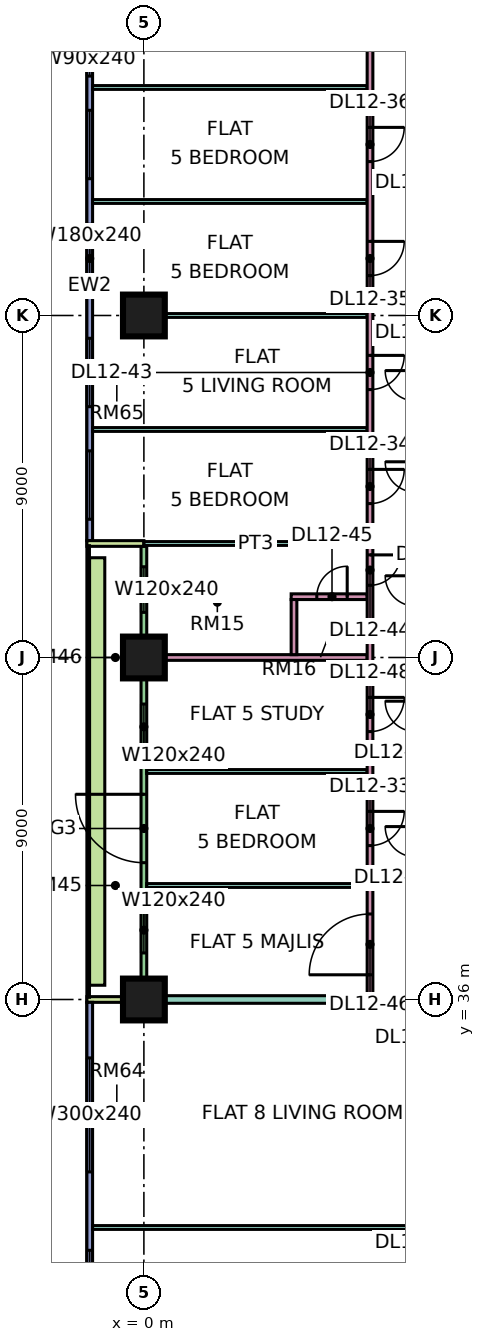
"""IFC4 building model, lengths in metres.
Left out: names, types, materials, properties, quantities, classifications, styles, units other than length and angle.
Written with IfcOpenShell. Run it as: python <this file> out.ifc"""

import sys

from ifc_helpers import new_model, si_unit, direction, frame, frame_2d, origin, origin_2d, place, context, subcontext, project, spatial, rectangle, extrude, element, fill, save


model = new_model("IFC4")
c1 = context("Model", 3, precision=1e-05, world=origin(), true_north=direction((0.0, 1.0)))
c2 = subcontext(c1, "Body", "Model", "MODEL_VIEW")
j1 = project(units=[si_unit("LENGTHUNIT", "METRE"), si_unit("PLANEANGLEUNIT", "RADIAN")], contexts=[c1])
p1 = place(None, origin())
s1 = spatial("IfcSite", under=j1, at=p1, CompositionType="ELEMENT")
p2 = place(p1, origin())
s2 = spatial("IfcBuilding", under=s1, at=p2, CompositionType="ELEMENT")
p3 = place(p2, frame((0.0, 0.0, 60.15)))
s3 = spatial("IfcBuildingStorey", under=s2, at=p3, CompositionType="ELEMENT", Elevation=60.15)
p4 = place(p3, frame((0.0, 36.0, 0.0), z_axis=(0.0, 0.0, 1.0), x_axis=(1.0, 0.0, 0.0)))
e1 = element("IfcColumn", 1, at=p4, inside=s3, PredefinedType="COLUMN", context=c2, shape_type="SweptSolid", body=[
    extrude(rectangle(XDim=1.1, YDim=1.1, at=origin_2d()), origin(), (0.0, 0.0, 1.0), 3.75),
])
p5 = place(p3, frame((0.0, 45.0, 0.0), z_axis=(0.0, 0.0, 1.0), x_axis=(1.0, 0.0, 0.0)))
e2 = element("IfcColumn", 2, at=p5, inside=s3, PredefinedType="COLUMN", context=c2, shape_type="SweptSolid", body=[
    extrude(rectangle(XDim=1.1, YDim=1.1, at=origin_2d()), origin(), (0.0, 0.0, 1.0), 3.75),
])
p6 = place(p3, frame((0.0, 54.0, 0.0), z_axis=(0.0, 0.0, 1.0), x_axis=(1.0, 0.0, 0.0)))
e3 = element("IfcColumn", 3, at=p6, inside=s3, PredefinedType="COLUMN", context=c2, shape_type="SweptSolid", body=[
    extrude(rectangle(XDim=1.1, YDim=1.1, at=origin_2d()), origin(), (0.0, 0.0, 1.0), 3.75),
])
p7 = place(p3, frame((-1.425, 61.5, 0.0), z_axis=(0.0, 0.0, 1.0), x_axis=(0.0, -1.0, 0.0)))
e4 = element("IfcWall", 4, at=p7, inside=s3, PredefinedType="SOLIDWALL", context=c2, shape_type="SweptSolid", body=[
    extrude(rectangle(XDim=13.425, YDim=0.15, at=frame_2d((6.712, 0.0))), origin(), (0.0, 0.0, 1.0), 3.35),
])
p8 = place(p7, frame((0.3, 0.0, 0.45)))
e5 = element("IfcOpeningElement", 5, at=p8, cuts=e4, PredefinedType="OPENING", context=c2, shape_type="SweptSolid", body=[
    extrude(rectangle(XDim=0.9, YDim=2.4, at=frame_2d((0.45, 1.2))), frame((0.0, 0.085, 0.0), z_axis=(0.0, -1.0, 0.0), x_axis=(1.0, 0.0, 0.0)), (0.0, 0.0, 1.0), 0.17),
])
p9 = place(p7, frame((2.1, 0.0, 0.45)))
e6 = element("IfcOpeningElement", 6, at=p9, cuts=e4, PredefinedType="OPENING", context=c2, shape_type="SweptSolid", body=[
    extrude(rectangle(XDim=1.8, YDim=2.4, at=frame_2d((0.9, 1.2))), frame((0.0, 0.085, 0.0), z_axis=(0.0, -1.0, 0.0), x_axis=(1.0, 0.0, 0.0)), (0.0, 0.0, 1.0), 0.17),
])
p10 = place(p7, frame((5.1, 0.0, 0.45)))
e7 = element("IfcOpeningElement", 7, at=p10, cuts=e4, PredefinedType="OPENING", context=c2, shape_type="SweptSolid", body=[
    extrude(rectangle(XDim=1.8, YDim=2.4, at=frame_2d((0.9, 1.2))), frame((0.0, 0.085, 0.0), z_axis=(0.0, -1.0, 0.0), x_axis=(1.0, 0.0, 0.0)), (0.0, 0.0, 1.0), 0.17),
])
p11 = place(p7, frame((8.1, 0.0, 0.45)))
e8 = element("IfcOpeningElement", 8, at=p11, cuts=e4, PredefinedType="OPENING", context=c2, shape_type="SweptSolid", body=[
    extrude(rectangle(XDim=1.8, YDim=2.4, at=frame_2d((0.9, 1.2))), frame((0.0, 0.085, 0.0), z_axis=(0.0, -1.0, 0.0), x_axis=(1.0, 0.0, 0.0)), (0.0, 0.0, 1.0), 0.17),
])
p12 = place(p7, frame((11.062, 0.0, 0.45)))
e9 = element("IfcOpeningElement", 9, at=p12, cuts=e4, PredefinedType="OPENING", context=c2, shape_type="SweptSolid", body=[
    extrude(rectangle(XDim=1.8, YDim=2.4, at=frame_2d((0.9, 1.2))), frame((0.0, 0.085, 0.0), z_axis=(0.0, -1.0, 0.0), x_axis=(1.0, 0.0, 0.0)), (0.0, 0.0, 1.0), 0.17),
])
p13 = place(p3, frame((0.0, 47.925, 0.0), z_axis=(0.0, 0.0, 1.0), x_axis=(0.0, -1.0, 0.0)))
e10 = element("IfcWall", 10, at=p13, inside=s3, PredefinedType="SOLIDWALL", context=c2, shape_type="SweptSolid", body=[
    extrude(rectangle(XDim=11.85, YDim=0.15, at=frame_2d((5.925, 0.0))), origin(), (0.0, 0.0, 1.0), 3.35),
])
p14 = place(p13, frame((0.538, 0.0, 0.45)))
e11 = element("IfcOpeningElement", 11, at=p14, cuts=e10, PredefinedType="OPENING", context=c2, shape_type="SweptSolid", body=[
    extrude(rectangle(XDim=1.2, YDim=2.4, at=frame_2d((0.6, 1.2))), frame((0.0, 0.085, 0.0), z_axis=(0.0, -1.0, 0.0), x_axis=(1.0, 0.0, 0.0)), (0.0, 0.0, 1.0), 0.17),
])
p15 = place(p13, frame((4.15, 0.0, 0.45)))
e12 = element("IfcOpeningElement", 12, at=p15, cuts=e10, PredefinedType="OPENING", context=c2, shape_type="SweptSolid", body=[
    extrude(rectangle(XDim=1.2, YDim=2.4, at=frame_2d((0.6, 1.2))), frame((0.0, 0.085, 0.0), z_axis=(0.0, -1.0, 0.0), x_axis=(1.0, 0.0, 0.0)), (0.0, 0.0, 1.0), 0.17),
])
p16 = place(p13, frame((6.525, 0.0, 0.0)))
e13 = element("IfcOpeningElement", 13, at=p16, cuts=e10, PredefinedType="OPENING", context=c2, shape_type="SweptSolid", body=[
    extrude(rectangle(XDim=1.8, YDim=2.4, at=frame_2d((0.9, 1.2))), frame((0.0, 0.085, 0.0), z_axis=(0.0, -1.0, 0.0), x_axis=(1.0, 0.0, 0.0)), (0.0, 0.0, 1.0), 0.17),
])
p17 = place(p13, frame((9.5, 0.0, 0.45)))
e14 = element("IfcOpeningElement", 14, at=p17, cuts=e10, PredefinedType="OPENING", context=c2, shape_type="SweptSolid", body=[
    extrude(rectangle(XDim=1.2, YDim=2.4, at=frame_2d((0.6, 1.2))), frame((0.0, 0.085, 0.0), z_axis=(0.0, -1.0, 0.0), x_axis=(1.0, 0.0, 0.0)), (0.0, 0.0, 1.0), 0.17),
])
for number, where, z_axis, x_axis in (
    (15, (-1.5, 48.0, 0.0), (0.0, 0.0, 1.0), (1.0, 0.0, 0.0)),
    (16, (-1.5, 36.0, 0.0), (0.0, 0.0, 1.0), (1.0, 0.0, 0.0)),
):
    element("IfcWall", number, at=place(p3, frame(where, z_axis=z_axis, x_axis=x_axis)), inside=s3, PredefinedType="SOLIDWALL", context=c2, shape_type="SweptSolid", body=[
        extrude(rectangle(XDim=1.5, YDim=0.15, at=frame_2d((0.75, 0.0))), origin(), (0.0, 0.0, 1.0), 3.35),
    ])
p18 = place(p3, frame((-1.425, 35.925, 0.0), z_axis=(0.0, 0.0, 1.0), x_axis=(0.0, -1.0, 0.0)))
e17 = element("IfcWall", 17, at=p18, inside=s3, PredefinedType="SOLIDWALL", context=c2, shape_type="SweptSolid", body=[
    extrude(rectangle(XDim=11.85, YDim=0.15, at=frame_2d((5.925, 0.0))), origin(), (0.0, 0.0, 1.0), 3.35),
])
p19 = place(p18, frame((1.462, 0.0, 0.45)))
e18 = element("IfcOpeningElement", 18, at=p19, cuts=e17, PredefinedType="OPENING", context=c2, shape_type="SweptSolid", body=[
    extrude(rectangle(XDim=3.0, YDim=2.4, at=frame_2d((1.5, 1.2))), frame((0.0, 0.085, 0.0), z_axis=(0.0, -1.0, 0.0), x_axis=(1.0, 0.0, 0.0)), (0.0, 0.0, 1.0), 0.17),
])
p20 = place(p18, frame((6.525, 0.0, 0.45)))
e19 = element("IfcOpeningElement", 19, at=p20, cuts=e17, PredefinedType="OPENING", context=c2, shape_type="SweptSolid", body=[
    extrude(rectangle(XDim=1.8, YDim=2.4, at=frame_2d((0.9, 1.2))), frame((0.0, 0.085, 0.0), z_axis=(0.0, -1.0, 0.0), x_axis=(1.0, 0.0, 0.0)), (0.0, 0.0, 1.0), 0.17),
])
p21 = place(p18, frame((9.488, 0.0, 0.45)))
e20 = element("IfcOpeningElement", 20, at=p21, cuts=e17, PredefinedType="OPENING", context=c2, shape_type="SweptSolid", body=[
    extrude(rectangle(XDim=1.8, YDim=2.4, at=frame_2d((0.9, 1.2))), frame((0.0, 0.085, 0.0), z_axis=(0.0, -1.0, 0.0), x_axis=(1.0, 0.0, 0.0)), (0.0, 0.0, 1.0), 0.17),
])
p22 = place(p3, frame((-1.229, 47.625, 0.0), z_axis=(0.0, 0.0, 1.0), x_axis=(0.0, -1.0, 0.0)))
e21 = element("IfcWall", 21, at=p22, inside=s3, PredefinedType="SOLIDWALL", context=c2, shape_type="SweptSolid", body=[
    extrude(rectangle(XDim=11.25, YDim=0.4, at=frame_2d((5.625, 0.0))), origin(), (0.0, 0.0, 1.0), 0.7),
])
for number, where, z_axis, x_axis in (
    (22, (-1.351, 57.0, 0.0), (0.0, 0.0, 1.0), (1.0, 0.0, 0.0)),
    (23, (-1.351, 60.0, 0.0), (0.0, 0.0, 1.0), (1.0, 0.0, 0.0)),
):
    element("IfcWall", number, at=place(p3, frame(where, z_axis=z_axis, x_axis=x_axis)), inside=s3, PredefinedType="PARTITIONING", context=c2, shape_type="SweptSolid", body=[
        extrude(rectangle(XDim=7.226, YDim=0.1, at=frame_2d((3.613, 0.0))), origin(), (0.0, 0.0, 1.0), 3.35),
    ])
p23 = place(p3, frame((-1.35, 30.0, 0.0), z_axis=(0.0, 0.0, 1.0), x_axis=(1.0, 0.0, 0.0)))
e24 = element("IfcWall", 24, at=p23, inside=s3, PredefinedType="PARTITIONING", context=c2, shape_type="SweptSolid", body=[
    extrude(rectangle(XDim=8.45, YDim=0.1, at=frame_2d((4.225, 0.0))), origin(), (0.0, 0.0, 1.0), 3.35),
])
e25 = element("IfcWall", 25, at=p4, inside=s3, PredefinedType="PARTITIONING", context=c2, shape_type="SweptSolid", body=[
    extrude(rectangle(XDim=12.45, YDim=0.2, at=frame_2d((6.225, 0.0))), origin(), (0.0, 0.0, 1.0), 3.35),
])
p24 = place(p3, frame((0.0, 48.0, 0.0), z_axis=(0.0, 0.0, 1.0), x_axis=(1.0, 0.0, 0.0)))
e26 = element("IfcWall", 26, at=p24, inside=s3, PredefinedType="PARTITIONING", context=c2, shape_type="SweptSolid", body=[
    extrude(rectangle(XDim=5.875, YDim=0.1, at=frame_2d((2.938, 0.0))), origin(), (0.0, 0.0, 1.0), 3.35),
])
p25 = place(p3, frame((-1.35, 51.0, 0.0), z_axis=(0.0, 0.0, 1.0), x_axis=(1.0, 0.0, 0.0)))
e27 = element("IfcWall", 27, at=p25, inside=s3, PredefinedType="PARTITIONING", context=c2, shape_type="SweptSolid", body=[
    extrude(rectangle(XDim=7.225, YDim=0.1, at=frame_2d((3.613, 0.0))), origin(), (0.0, 0.0, 1.0), 3.35),
])
e28 = element("IfcWall", 28, at=p6, inside=s3, PredefinedType="PARTITIONING", context=c2, shape_type="SweptSolid", body=[
    extrude(rectangle(XDim=5.875, YDim=0.1, at=frame_2d((2.938, 0.0))), origin(), (0.0, 0.0, 1.0), 3.35),
])
for number, where, z_axis, x_axis in (
    (29, (0.074, 39.0, 0.0), (0.0, 0.0, 1.0), (1.0, 0.0, 0.0)),
    (30, (0.074, 42.0, 0.0), (0.0, 0.0, 1.0), (1.0, 0.0, 0.0)),
):
    element("IfcWall", number, at=place(p3, frame(where, z_axis=z_axis, x_axis=x_axis)), inside=s3, PredefinedType="PARTITIONING", context=c2, shape_type="SweptSolid", body=[
        extrude(rectangle(XDim=5.801, YDim=0.1, at=frame_2d((2.9, 0.0))), origin(), (0.0, 0.0, 1.0), 3.35),
    ])
p26 = place(p3, frame((0.074, 45.0, 0.0), z_axis=(0.0, 0.0, 1.0), x_axis=(1.0, 0.0, 0.0)))
e31 = element("IfcWall", 31, at=p26, inside=s3, PredefinedType="PARTITIONING", context=c2, shape_type="SweptSolid", body=[
    extrude(rectangle(XDim=5.801, YDim=0.15, at=frame_2d((2.9, 0.0))), origin(), (0.0, 0.0, 1.0), 3.35),
])
p27 = place(p3, frame((3.875, 46.6, 0.0), z_axis=(0.0, 0.0, 1.0), x_axis=(1.0, 0.0, 0.0)))
e32 = element("IfcWall", 32, at=p27, inside=s3, PredefinedType="PARTITIONING", context=c2, shape_type="SweptSolid", body=[
    extrude(rectangle(XDim=2.0, YDim=0.15, at=frame_2d((1.0, 0.0))), origin(), (0.0, 0.0, 1.0), 3.35),
])
p28 = place(p27, frame((0.675, 0.0, 0.0)))
e33 = element("IfcOpeningElement", 33, at=p28, cuts=e32, PredefinedType="OPENING", context=c2, shape_type="SweptSolid", body=[
    extrude(rectangle(XDim=0.8, YDim=2.1, at=frame_2d((0.4, 1.05))), frame((0.0, 0.085, 0.0), z_axis=(0.0, -1.0, 0.0), x_axis=(1.0, 0.0, 0.0)), (0.0, 0.0, 1.0), 0.17),
])
p29 = place(p3, frame((3.95, 45.075, 0.0), z_axis=(0.0, 0.0, 1.0), x_axis=(0.0, 1.0, 0.0)))
e34 = element("IfcWall", 34, at=p29, inside=s3, PredefinedType="PARTITIONING", context=c2, shape_type="SweptSolid", body=[
    extrude(rectangle(XDim=1.45, YDim=0.15, at=frame_2d((0.725, 0.0))), origin(), (0.0, 0.0, 1.0), 3.35),
])
p30 = place(p3, frame((5.95, 36.1, 0.0), z_axis=(0.0, 0.0, 1.0), x_axis=(0.0, 1.0, 0.0)))
e35 = element("IfcWall", 35, at=p30, inside=s3, PredefinedType="PARTITIONING", context=c2, shape_type="SweptSolid", body=[
    extrude(rectangle(XDim=28.25, YDim=0.15, at=frame_2d((14.125, 0.0))), origin(), (0.0, 0.0, 1.0), 3.35),
])
p31 = place(p30, frame((3.95, 0.0, 0.0)))
e36 = element("IfcOpeningElement", 36, at=p31, cuts=e35, PredefinedType="OPENING", context=c2, shape_type="SweptSolid", body=[
    extrude(rectangle(XDim=0.9, YDim=2.1, at=frame_2d((0.45, 1.05))), frame((0.0, 0.085, 0.0), z_axis=(0.0, -1.0, 0.0), x_axis=(1.0, 0.0, 0.0)), (0.0, 0.0, 1.0), 0.17),
])
p32 = place(p30, frame((12.95, 0.0, 0.0)))
e37 = element("IfcOpeningElement", 37, at=p32, cuts=e35, PredefinedType="OPENING", context=c2, shape_type="SweptSolid", body=[
    extrude(rectangle(XDim=0.9, YDim=2.1, at=frame_2d((0.45, 1.05))), frame((0.0, 0.085, 0.0), z_axis=(0.0, -1.0, 0.0), x_axis=(1.0, 0.0, 0.0)), (0.0, 0.0, 1.0), 0.17),
])
p33 = place(p30, frame((18.95, 0.0, 0.0)))
e38 = element("IfcOpeningElement", 38, at=p33, cuts=e35, PredefinedType="OPENING", context=c2, shape_type="SweptSolid", body=[
    extrude(rectangle(XDim=0.9, YDim=2.1, at=frame_2d((0.45, 1.05))), frame((0.0, 0.085, 0.0), z_axis=(0.0, -1.0, 0.0), x_axis=(1.0, 0.0, 0.0)), (0.0, 0.0, 1.0), 0.17),
])
p34 = place(p30, frame((21.95, 0.0, 0.0)))
e39 = element("IfcOpeningElement", 39, at=p34, cuts=e35, PredefinedType="OPENING", context=c2, shape_type="SweptSolid", body=[
    extrude(rectangle(XDim=0.9, YDim=2.1, at=frame_2d((0.45, 1.05))), frame((0.0, 0.085, 0.0), z_axis=(0.0, -1.0, 0.0), x_axis=(1.0, 0.0, 0.0)), (0.0, 0.0, 1.0), 0.17),
])
p35 = place(p30, frame((24.95, 0.0, 0.0)))
e40 = element("IfcOpeningElement", 40, at=p35, cuts=e35, PredefinedType="OPENING", context=c2, shape_type="SweptSolid", body=[
    extrude(rectangle(XDim=0.9, YDim=2.1, at=frame_2d((0.45, 1.05))), frame((0.0, 0.085, 0.0), z_axis=(0.0, -1.0, 0.0), x_axis=(1.0, 0.0, 0.0)), (0.0, 0.0, 1.0), 0.17),
])
p36 = place(p30, frame((15.95, 0.0, 0.0)))
e41 = element("IfcOpeningElement", 41, at=p36, cuts=e35, PredefinedType="OPENING", context=c2, shape_type="SweptSolid", body=[
    extrude(rectangle(XDim=0.9, YDim=2.1, at=frame_2d((0.45, 1.05))), frame((0.0, 0.085, 0.0), z_axis=(0.0, -1.0, 0.0), x_axis=(1.0, 0.0, 0.0)), (0.0, 0.0, 1.0), 0.17),
])
p37 = place(p30, frame((10.8, 0.0, 0.0)))
e42 = element("IfcOpeningElement", 42, at=p37, cuts=e35, PredefinedType="OPENING", context=c2, shape_type="SweptSolid", body=[
    extrude(rectangle(XDim=0.8, YDim=2.1, at=frame_2d((0.4, 1.05))), frame((0.0, 0.085, 0.0), z_axis=(0.0, -1.0, 0.0), x_axis=(1.0, 0.0, 0.0)), (0.0, 0.0, 1.0), 0.17),
])
p38 = place(p30, frame((0.55, 0.0, 0.0)))
e43 = element("IfcOpeningElement", 43, at=p38, cuts=e35, PredefinedType="OPENING", context=c2, shape_type="SweptSolid", body=[
    extrude(rectangle(XDim=1.6, YDim=2.1, at=frame_2d((0.8, 1.05))), frame((0.0, 0.085, 0.0), z_axis=(0.0, -1.0, 0.0), x_axis=(1.0, 0.0, 0.0)), (0.0, 0.0, 1.0), 0.17),
])
p39 = place(p30, frame((6.95, 0.0, 0.0)))
e44 = element("IfcOpeningElement", 44, at=p39, cuts=e35, PredefinedType="OPENING", context=c2, shape_type="SweptSolid", body=[
    extrude(rectangle(XDim=0.9, YDim=2.1, at=frame_2d((0.45, 1.05))), frame((0.0, 0.085, 0.0), z_axis=(0.0, -1.0, 0.0), x_axis=(1.0, 0.0, 0.0)), (0.0, 0.0, 1.0), 0.17),
])
p40 = place(p8, origin())
e45 = element("IfcWindow", 45, at=p40, inside=s3, PartitioningType="SINGLE_PANEL", PredefinedType="WINDOW", context=c2, shape_type="SweptSolid", body=[
    extrude(rectangle(XDim=0.9, YDim=2.4, at=frame_2d((0.45, 1.2))), frame((0.0, 0.03, 0.0), z_axis=(0.0, -1.0, 0.0), x_axis=(1.0, 0.0, 0.0)), (0.0, 0.0, 1.0), 0.06),
])
fill(e5, e45)
p41 = place(p9, origin())
e46 = element("IfcWindow", 46, at=p41, inside=s3, PartitioningType="SINGLE_PANEL", PredefinedType="WINDOW", context=c2, shape_type="SweptSolid", body=[
    extrude(rectangle(XDim=1.8, YDim=2.4, at=frame_2d((0.9, 1.2))), frame((0.0, 0.03, 0.0), z_axis=(0.0, -1.0, 0.0), x_axis=(1.0, 0.0, 0.0)), (0.0, 0.0, 1.0), 0.06),
])
fill(e6, e46)
p42 = place(p10, origin())
e47 = element("IfcWindow", 47, at=p42, inside=s3, PartitioningType="SINGLE_PANEL", PredefinedType="WINDOW", context=c2, shape_type="SweptSolid", body=[
    extrude(rectangle(XDim=1.8, YDim=2.4, at=frame_2d((0.9, 1.2))), frame((0.0, 0.03, 0.0), z_axis=(0.0, -1.0, 0.0), x_axis=(1.0, 0.0, 0.0)), (0.0, 0.0, 1.0), 0.06),
])
fill(e7, e47)
p43 = place(p11, origin())
e48 = element("IfcWindow", 48, at=p43, inside=s3, PartitioningType="SINGLE_PANEL", PredefinedType="WINDOW", context=c2, shape_type="SweptSolid", body=[
    extrude(rectangle(XDim=1.8, YDim=2.4, at=frame_2d((0.9, 1.2))), frame((0.0, 0.03, 0.0), z_axis=(0.0, -1.0, 0.0), x_axis=(1.0, 0.0, 0.0)), (0.0, 0.0, 1.0), 0.06),
])
fill(e8, e48)
p44 = place(p12, origin())
e49 = element("IfcWindow", 49, at=p44, inside=s3, PartitioningType="SINGLE_PANEL", PredefinedType="WINDOW", context=c2, shape_type="SweptSolid", body=[
    extrude(rectangle(XDim=1.8, YDim=2.4, at=frame_2d((0.9, 1.2))), frame((0.0, 0.03, 0.0), z_axis=(0.0, -1.0, 0.0), x_axis=(1.0, 0.0, 0.0)), (0.0, 0.0, 1.0), 0.06),
])
fill(e9, e49)
p45 = place(p14, origin())
e50 = element("IfcWindow", 50, at=p45, inside=s3, PartitioningType="SINGLE_PANEL", PredefinedType="WINDOW", context=c2, shape_type="SweptSolid", body=[
    extrude(rectangle(XDim=1.2, YDim=2.4, at=frame_2d((0.6, 1.2))), frame((0.0, 0.03, 0.0), z_axis=(0.0, -1.0, 0.0), x_axis=(1.0, 0.0, 0.0)), (0.0, 0.0, 1.0), 0.06),
])
fill(e11, e50)
p46 = place(p15, origin())
e51 = element("IfcWindow", 51, at=p46, inside=s3, PartitioningType="SINGLE_PANEL", PredefinedType="WINDOW", context=c2, shape_type="SweptSolid", body=[
    extrude(rectangle(XDim=1.2, YDim=2.4, at=frame_2d((0.6, 1.2))), frame((0.0, 0.03, 0.0), z_axis=(0.0, -1.0, 0.0), x_axis=(1.0, 0.0, 0.0)), (0.0, 0.0, 1.0), 0.06),
])
fill(e12, e51)
p47 = place(p16, frame((1.8, 0.0, 0.0), z_axis=(0.0, 0.0, 1.0), x_axis=(-1.0, 0.0, 0.0)))
e52 = element("IfcDoor", 52, at=p47, inside=s3, OperationType="DOUBLE_DOOR_SINGLE_SWING", PredefinedType="DOOR", context=c2, shape_type="SweptSolid", body=[
    extrude(rectangle(XDim=1.8, YDim=2.4, at=frame_2d((0.9, 1.2))), frame((0.0, 0.025, 0.0), z_axis=(0.0, -1.0, 0.0), x_axis=(1.0, 0.0, 0.0)), (0.0, 0.0, 1.0), 0.05),
])
fill(e13, e52)
p48 = place(p17, origin())
e53 = element("IfcWindow", 53, at=p48, inside=s3, PartitioningType="SINGLE_PANEL", PredefinedType="WINDOW", context=c2, shape_type="SweptSolid", body=[
    extrude(rectangle(XDim=1.2, YDim=2.4, at=frame_2d((0.6, 1.2))), frame((0.0, 0.03, 0.0), z_axis=(0.0, -1.0, 0.0), x_axis=(1.0, 0.0, 0.0)), (0.0, 0.0, 1.0), 0.06),
])
fill(e14, e53)
p49 = place(p19, origin())
e54 = element("IfcWindow", 54, at=p49, inside=s3, PartitioningType="SINGLE_PANEL", PredefinedType="WINDOW", context=c2, shape_type="SweptSolid", body=[
    extrude(rectangle(XDim=3.0, YDim=2.4, at=frame_2d((1.5, 1.2))), frame((0.0, 0.03, 0.0), z_axis=(0.0, -1.0, 0.0), x_axis=(1.0, 0.0, 0.0)), (0.0, 0.0, 1.0), 0.06),
])
fill(e18, e54)
p50 = place(p20, origin())
e55 = element("IfcWindow", 55, at=p50, inside=s3, PartitioningType="SINGLE_PANEL", PredefinedType="WINDOW", context=c2, shape_type="SweptSolid", body=[
    extrude(rectangle(XDim=1.8, YDim=2.4, at=frame_2d((0.9, 1.2))), frame((0.0, 0.03, 0.0), z_axis=(0.0, -1.0, 0.0), x_axis=(1.0, 0.0, 0.0)), (0.0, 0.0, 1.0), 0.06),
])
fill(e19, e55)
p51 = place(p31, origin())
e56 = element("IfcDoor", 56, at=p51, inside=s3, OperationType="SINGLE_SWING_RIGHT", PredefinedType="DOOR", context=c2, shape_type="SweptSolid", body=[
    extrude(rectangle(XDim=0.9, YDim=2.1, at=frame_2d((0.45, 1.05))), frame((0.0, 0.025, 0.0), z_axis=(0.0, -1.0, 0.0), x_axis=(1.0, 0.0, 0.0)), (0.0, 0.0, 1.0), 0.05),
])
fill(e36, e56)
p52 = place(p32, origin())
e57 = element("IfcDoor", 57, at=p52, inside=s3, OperationType="SINGLE_SWING_RIGHT", PredefinedType="DOOR", context=c2, shape_type="SweptSolid", body=[
    extrude(rectangle(XDim=0.9, YDim=2.1, at=frame_2d((0.45, 1.05))), frame((0.0, 0.025, 0.0), z_axis=(0.0, -1.0, 0.0), x_axis=(1.0, 0.0, 0.0)), (0.0, 0.0, 1.0), 0.05),
])
fill(e37, e57)
p53 = place(p33, origin())
e58 = element("IfcDoor", 58, at=p53, inside=s3, OperationType="SINGLE_SWING_RIGHT", PredefinedType="DOOR", context=c2, shape_type="SweptSolid", body=[
    extrude(rectangle(XDim=0.9, YDim=2.1, at=frame_2d((0.45, 1.05))), frame((0.0, 0.025, 0.0), z_axis=(0.0, -1.0, 0.0), x_axis=(1.0, 0.0, 0.0)), (0.0, 0.0, 1.0), 0.05),
])
fill(e38, e58)
p54 = place(p34, origin())
e59 = element("IfcDoor", 59, at=p54, inside=s3, OperationType="SINGLE_SWING_RIGHT", PredefinedType="DOOR", context=c2, shape_type="SweptSolid", body=[
    extrude(rectangle(XDim=0.9, YDim=2.1, at=frame_2d((0.45, 1.05))), frame((0.0, 0.025, 0.0), z_axis=(0.0, -1.0, 0.0), x_axis=(1.0, 0.0, 0.0)), (0.0, 0.0, 1.0), 0.05),
])
fill(e39, e59)
p55 = place(p36, origin())
e60 = element("IfcDoor", 60, at=p55, inside=s3, OperationType="SINGLE_SWING_RIGHT", PredefinedType="DOOR", context=c2, shape_type="SweptSolid", body=[
    extrude(rectangle(XDim=0.9, YDim=2.1, at=frame_2d((0.45, 1.05))), frame((0.0, 0.025, 0.0), z_axis=(0.0, -1.0, 0.0), x_axis=(1.0, 0.0, 0.0)), (0.0, 0.0, 1.0), 0.05),
])
fill(e41, e60)
p56 = place(p37, origin())
e61 = element("IfcDoor", 61, at=p56, inside=s3, OperationType="SINGLE_SWING_RIGHT", PredefinedType="DOOR", context=c2, shape_type="SweptSolid", body=[
    extrude(rectangle(XDim=0.8, YDim=2.1, at=frame_2d((0.4, 1.05))), frame((0.0, 0.025, 0.0), z_axis=(0.0, -1.0, 0.0), x_axis=(1.0, 0.0, 0.0)), (0.0, 0.0, 1.0), 0.05),
])
fill(e42, e61)
p57 = place(p28, frame((0.8, 0.0, 0.0), z_axis=(0.0, 0.0, 1.0), x_axis=(-1.0, 0.0, 0.0)))
e62 = element("IfcDoor", 62, at=p57, inside=s3, OperationType="SINGLE_SWING_RIGHT", PredefinedType="DOOR", context=c2, shape_type="SweptSolid", body=[
    extrude(rectangle(XDim=0.8, YDim=2.1, at=frame_2d((0.4, 1.05))), frame((0.0, 0.025, 0.0), z_axis=(0.0, -1.0, 0.0), x_axis=(1.0, 0.0, 0.0)), (0.0, 0.0, 1.0), 0.05),
])
fill(e33, e62)
p58 = place(p38, origin())
e63 = element("IfcDoor", 63, at=p58, inside=s3, OperationType="DOUBLE_DOOR_SINGLE_SWING", PredefinedType="DOOR", context=c2, shape_type="SweptSolid", body=[
    extrude(rectangle(XDim=1.6, YDim=2.1, at=frame_2d((0.8, 1.05))), frame((0.0, 0.025, 0.0), z_axis=(0.0, -1.0, 0.0), x_axis=(1.0, 0.0, 0.0)), (0.0, 0.0, 1.0), 0.05),
])
fill(e43, e63)
p59 = place(p39, origin())
e64 = element("IfcDoor", 64, at=p59, inside=s3, OperationType="SINGLE_SWING_RIGHT", PredefinedType="DOOR", context=c2, shape_type="SweptSolid", body=[
    extrude(rectangle(XDim=0.9, YDim=2.1, at=frame_2d((0.45, 1.05))), frame((0.0, 0.025, 0.0), z_axis=(0.0, -1.0, 0.0), x_axis=(1.0, 0.0, 0.0)), (0.0, 0.0, 1.0), 0.05),
])
fill(e44, e64)
save(model, sys.argv[1])
